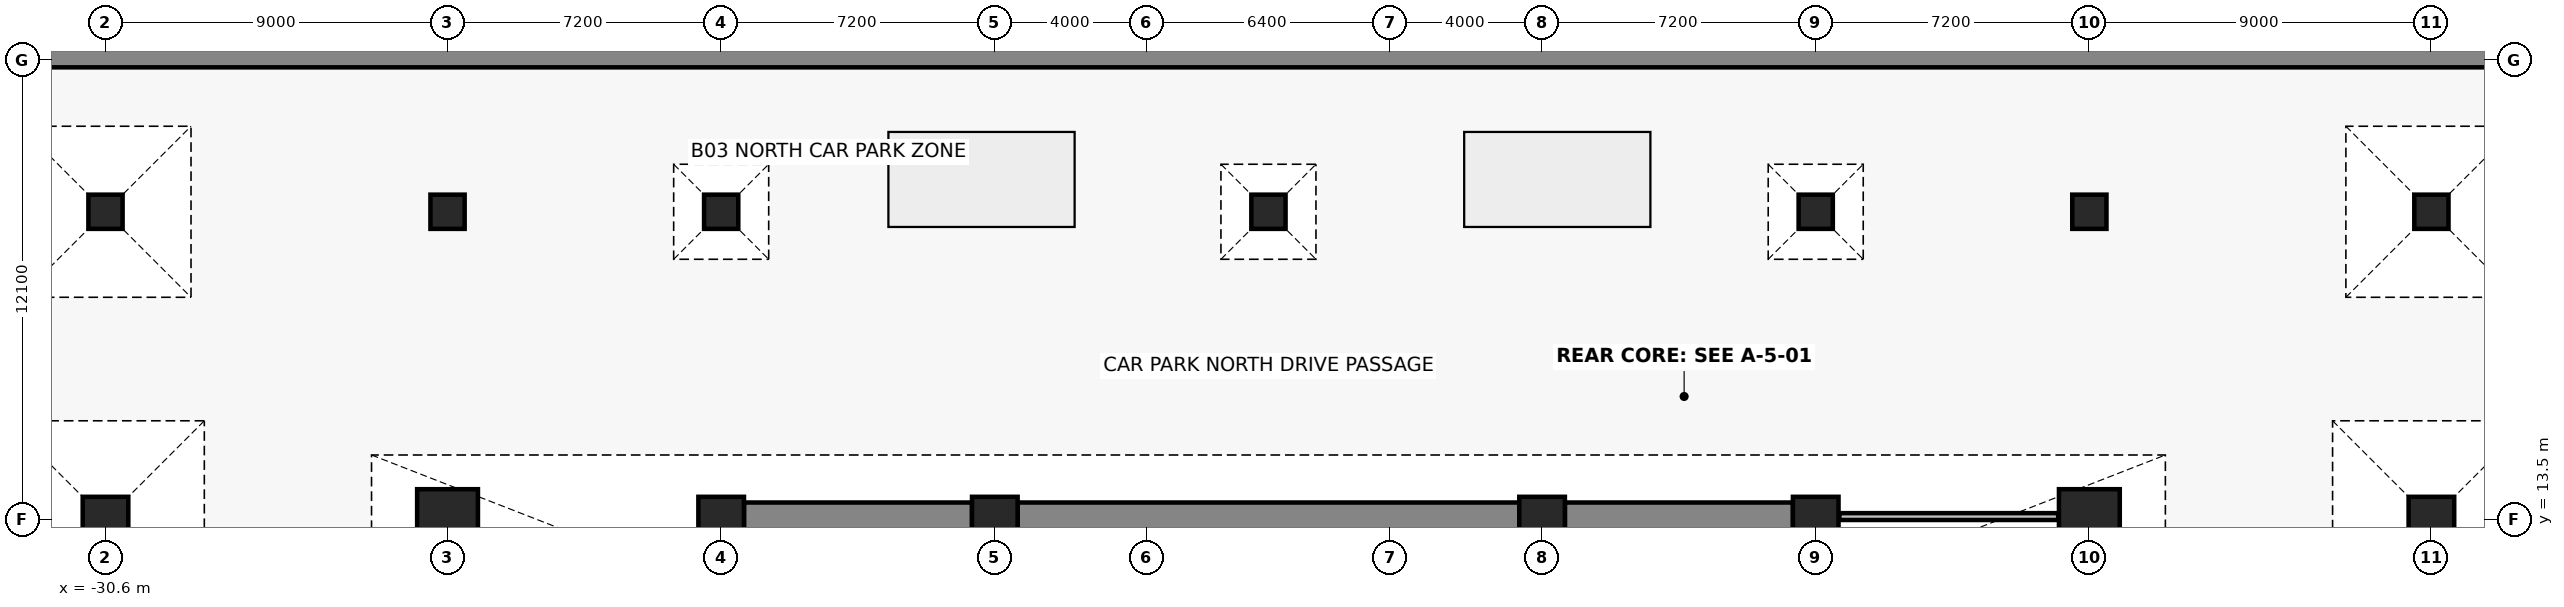
"""IFC4 building model, lengths in metres.
Left out: names, types, materials, properties, quantities, classifications, styles, units other than length and angle.
Written with IfcOpenShell. Run it as: python <this file> out.ifc"""

import sys

from ifc_helpers import new_model, si_unit, direction, frame, frame_2d, origin, origin_2d, place, context, subcontext, project, spatial, rectangle, extrude, element, save


model = new_model("IFC4")
c1 = context("Model", 3, precision=1e-05, world=origin(), true_north=direction((0.0, 1.0)))
c2 = subcontext(c1, "Body", "Model", "MODEL_VIEW")
j1 = project(units=[si_unit("LENGTHUNIT", "METRE"), si_unit("PLANEANGLEUNIT", "RADIAN")], contexts=[c1])
p1 = place(None, origin())
s1 = spatial("IfcSite", under=j1, at=p1, CompositionType="ELEMENT")
p2 = place(p1, origin())
s2 = spatial("IfcBuilding", under=s1, at=p2, CompositionType="ELEMENT")
p3 = place(p2, frame((0.0, 0.0, -13.2)))
s3 = spatial("IfcBuildingStorey", under=s2, at=p3, CompositionType="ELEMENT", Elevation=-13.2)
p4 = place(p3, frame((-37.0, 25.8, 0.0), z_axis=(0.0, 0.0, 1.0), x_axis=(1.0, 0.0, 0.0)))
e1 = element("IfcWall", 1, at=p4, inside=s3, PredefinedType="USERDEFINED", context=c2, shape_type="SweptSolid", body=[
    extrude(rectangle(XDim=74.0, YDim=0.8, at=frame_2d((37.0, 0.0))), origin(), (0.0, 0.0, 1.0), 4.12),
])
for number, where, z_axis, x_axis in (
    (2, (-14.4, 13.5, 0.0), (0.0, 0.0, 1.0), (1.0, 0.0, 0.0)),
    (3, (-7.2, 13.5, 0.0), (0.0, 0.0, 1.0), (1.0, 0.0, 0.0)),
    (4, (7.2, 13.5, 0.0), (0.0, 0.0, 1.0), (1.0, 0.0, 0.0)),
    (5, (14.4, 13.5, 0.0), (0.0, 0.0, 1.0), (1.0, 0.0, 0.0)),
):
    element("IfcColumn", number, at=place(p3, frame(where, z_axis=z_axis, x_axis=x_axis)), inside=s3, PredefinedType="COLUMN", context=c2, shape_type="SweptSolid", body=[
        extrude(rectangle(XDim=1.2, YDim=1.2, at=origin_2d()), origin(), (0.0, 0.0, 1.0), 4.4),
    ])
for number, where, z_axis, x_axis in (
    (6, (-21.6, 13.5, 0.0), (0.0, 0.0, 1.0), (1.0, 0.0, 0.0)),
    (7, (21.6, 13.5, 0.0), (0.0, 0.0, 1.0), (1.0, 0.0, 0.0)),
):
    element("IfcColumn", number, at=place(p3, frame(where, z_axis=z_axis, x_axis=x_axis)), inside=s3, PredefinedType="COLUMN", context=c2, shape_type="SweptSolid", body=[
        extrude(rectangle(XDim=1.6, YDim=1.6, at=origin_2d()), origin(), (0.0, 0.0, 1.0), 4.4),
    ])
for number, where, z_axis, x_axis in (
    (8, (-30.6, 13.5, 0.0), (0.0, 0.0, 1.0), (1.0, 0.0, 0.0)),
    (9, (30.6, 13.5, 0.0), (0.0, 0.0, 1.0), (1.0, 0.0, 0.0)),
):
    element("IfcColumn", number, at=place(p3, frame(where, z_axis=z_axis, x_axis=x_axis)), inside=s3, PredefinedType="COLUMN", context=c2, shape_type="SweptSolid", body=[
        extrude(rectangle(XDim=1.2, YDim=1.2, at=origin_2d()), origin(), (0.0, 0.0, 1.0), 4.4),
    ])
for number, where, z_axis, x_axis in (
    (10, (-30.6, 21.6, 0.0), (0.0, 0.0, 1.0), (1.0, 0.0, 0.0)),
    (11, (30.6, 21.6, 0.0), (0.0, 0.0, 1.0), (1.0, 0.0, 0.0)),
    (12, (-21.6, 21.6, 0.0), (0.0, 0.0, 1.0), (1.0, 0.0, 0.0)),
    (13, (21.6, 21.6, 0.0), (0.0, 0.0, 1.0), (1.0, 0.0, 0.0)),
    (14, (-14.4, 21.6, 0.0), (0.0, 0.0, 1.0), (1.0, 0.0, 0.0)),
    (15, (0.0, 21.6, 0.0), (0.0, 0.0, 1.0), (1.0, 0.0, 0.0)),
    (16, (14.4, 21.6, 0.0), (0.0, 0.0, 1.0), (1.0, 0.0, 0.0)),
):
    element("IfcColumn", number, at=place(p3, frame(where, z_axis=z_axis, x_axis=x_axis)), inside=s3, PredefinedType="COLUMN", context=c2, shape_type="SweptSolid", body=[
        extrude(rectangle(XDim=0.9, YDim=0.9, at=origin_2d()), origin(), (0.0, 0.0, 1.0), 4.4),
    ])
p5 = place(p3, frame((-13.8, 13.5, 0.0), z_axis=(0.0, 0.0, 1.0), x_axis=(1.0, 0.0, 0.0)))
e17 = element("IfcWall", 17, at=p5, inside=s3, PredefinedType="SHEAR", context=c2, shape_type="SweptSolid", body=[
    extrude(rectangle(XDim=6.0, YDim=0.9, at=frame_2d((3.0, 0.0))), origin(), (0.0, 0.0, 1.0), 4.12),
])
p6 = place(p3, frame((-6.6, 13.5, 0.0), z_axis=(0.0, 0.0, 1.0), x_axis=(1.0, 0.0, 0.0)))
e18 = element("IfcWall", 18, at=p6, inside=s3, PredefinedType="SHEAR", context=c2, shape_type="SweptSolid", body=[
    extrude(rectangle(XDim=13.2, YDim=0.9, at=frame_2d((6.6, 0.0))), origin(), (0.0, 0.0, 1.0), 4.12),
])
p7 = place(p3, frame((7.8, 13.5, 0.0), z_axis=(0.0, 0.0, 1.0), x_axis=(1.0, 0.0, 0.0)))
e19 = element("IfcWall", 19, at=p7, inside=s3, PredefinedType="SHEAR", context=c2, shape_type="SweptSolid", body=[
    extrude(rectangle(XDim=6.0, YDim=0.9, at=frame_2d((3.0, 0.0))), origin(), (0.0, 0.0, 1.0), 4.12),
])
p8 = place(p3, frame((15.02, 13.58, 0.0), z_axis=(0.0, 0.0, 1.0), x_axis=(1.0, 0.0, 0.0)))
e20 = element("IfcWall", 20, at=p8, inside=s3, PredefinedType="PARTITIONING", context=c2, shape_type="SweptSolid", body=[
    extrude(rectangle(XDim=5.76, YDim=0.18, at=frame_2d((2.88, 0.0))), origin(), (0.0, 0.0, 1.0), 3.41),
])
save(model, sys.argv[1])
